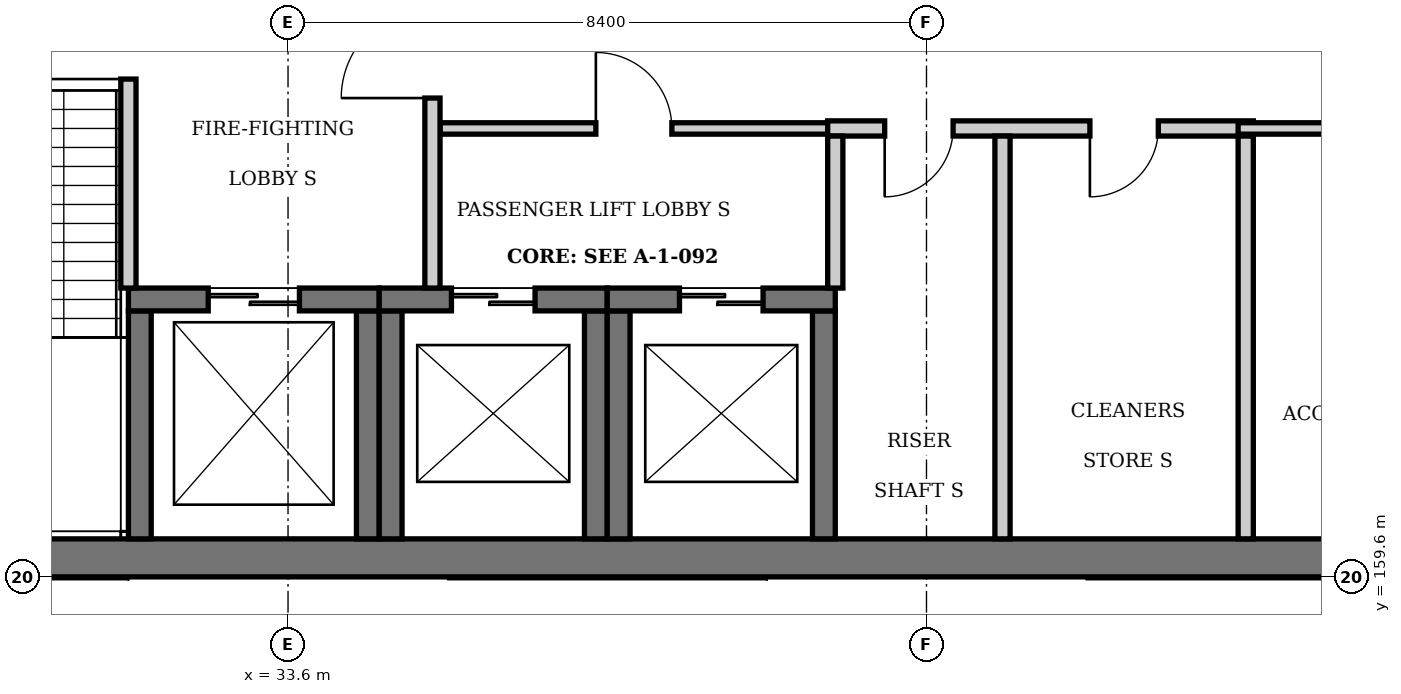
"""IFC4 building model, lengths in metres.
Left out: names, types, materials, properties, quantities, classifications, styles, units other than length and angle.
Written with IfcOpenShell. Run it as: python <this file> out.ifc"""

import sys

from ifc_helpers import new_model, si_unit, direction, frame, frame_2d, origin, place, context, subcontext, project, spatial, rectangle, extrude, element, fill, save


model = new_model("IFC4")
c1 = context("Model", 3, precision=1e-05, world=origin(), true_north=direction((0.0, 1.0)))
c2 = subcontext(c1, "Body", "Model", "MODEL_VIEW")
j1 = project(units=[si_unit("LENGTHUNIT", "METRE"), si_unit("PLANEANGLEUNIT", "RADIAN")], contexts=[c1])
p1 = place(None, origin())
s1 = spatial("IfcSite", under=j1, at=p1, CompositionType="ELEMENT")
p2 = place(p1, origin())
s2 = spatial("IfcBuilding", under=s1, at=p2, CompositionType="ELEMENT")
p3 = place(p2, frame((0.0, 0.0, 6.0)))
s3 = spatial("IfcBuildingStorey", under=s2, at=p3, CompositionType="ELEMENT", Elevation=6.0)
p4 = place(p3, frame((25.35, 159.85, 0.0), z_axis=(0.0, 0.0, 1.0), x_axis=(1.0, 0.0, 0.0)))
e1 = element("IfcWall", 1, at=p4, inside=s3, PredefinedType="SHEAR", context=c2, shape_type="SweptSolid", body=[
    extrude(rectangle(XDim=25.043, YDim=0.5, at=frame_2d((12.521, 0.0))), origin(), (0.0, 0.0, 1.0), 4.8),
])
for number, where, z_axis, x_axis in (
    (2, (34.65, 160.1, 0.0), (0.0, 0.0, 1.0), (0.0, 1.0, 0.0)),
    (3, (31.65, 160.1, 0.0), (0.0, 0.0, 1.0), (0.0, 1.0, 0.0)),
):
    element("IfcWall", number, at=place(p3, frame(where, z_axis=z_axis, x_axis=x_axis)), inside=s3, PredefinedType="SHEAR", context=c2, shape_type="SweptSolid", body=[
        extrude(rectangle(XDim=3.0, YDim=0.3, at=frame_2d((1.5, 0.0))), origin(), (0.0, 0.0, 1.0), 4.8),
    ])
p5 = place(p3, frame((31.5, 163.25, 0.0), z_axis=(0.0, 0.0, 1.0), x_axis=(1.0, 0.0, 0.0)))
e4 = element("IfcWall", 4, at=p5, inside=s3, PredefinedType="SHEAR", context=c2, shape_type="SweptSolid", body=[
    extrude(rectangle(XDim=3.3, YDim=0.3, at=frame_2d((1.65, 0.0))), origin(), (0.0, 0.0, 1.0), 4.8),
])
p6 = place(p5, frame((1.05, 0.0, 0.0)))
e5 = element("IfcOpeningElement", 5, at=p6, cuts=e4, PredefinedType="OPENING", context=c2, shape_type="SweptSolid", body=[
    extrude(rectangle(XDim=1.2, YDim=2.1, at=frame_2d((0.6, 1.05))), frame((0.0, 0.16, 0.0), z_axis=(0.0, -1.0, 0.0), x_axis=(1.0, 0.0, 0.0)), (0.0, 0.0, 1.0), 0.32),
])
for number, where, z_axis, x_axis in (
    (6, (37.65, 160.1, 0.0), (0.0, 0.0, 1.0), (0.0, 1.0, 0.0)),
    (7, (34.95, 160.1, 0.0), (0.0, 0.0, 1.0), (0.0, 1.0, 0.0)),
):
    element("IfcWall", number, at=place(p3, frame(where, z_axis=z_axis, x_axis=x_axis)), inside=s3, PredefinedType="SHEAR", context=c2, shape_type="SweptSolid", body=[
        extrude(rectangle(XDim=3.0, YDim=0.3, at=frame_2d((1.5, 0.0))), origin(), (0.0, 0.0, 1.0), 4.8),
    ])
p7 = place(p3, frame((34.8, 163.25, 0.0), z_axis=(0.0, 0.0, 1.0), x_axis=(1.0, 0.0, 0.0)))
e8 = element("IfcWall", 8, at=p7, inside=s3, PredefinedType="SHEAR", context=c2, shape_type="SweptSolid", body=[
    extrude(rectangle(XDim=3.0, YDim=0.3, at=frame_2d((1.5, 0.0))), origin(), (0.0, 0.0, 1.0), 4.8),
])
p8 = place(p7, frame((0.95, 0.0, 0.0)))
e9 = element("IfcOpeningElement", 9, at=p8, cuts=e8, PredefinedType="OPENING", context=c2, shape_type="SweptSolid", body=[
    extrude(rectangle(XDim=1.1, YDim=2.1, at=frame_2d((0.55, 1.05))), frame((0.0, 0.16, 0.0), z_axis=(0.0, -1.0, 0.0), x_axis=(1.0, 0.0, 0.0)), (0.0, 0.0, 1.0), 0.32),
])
for number, where, z_axis, x_axis in (
    (10, (40.65, 160.1, 0.0), (0.0, 0.0, 1.0), (0.0, 1.0, 0.0)),
    (11, (37.95, 160.1, 0.0), (0.0, 0.0, 1.0), (0.0, 1.0, 0.0)),
):
    element("IfcWall", number, at=place(p3, frame(where, z_axis=z_axis, x_axis=x_axis)), inside=s3, PredefinedType="SHEAR", context=c2, shape_type="SweptSolid", body=[
        extrude(rectangle(XDim=3.0, YDim=0.3, at=frame_2d((1.5, 0.0))), origin(), (0.0, 0.0, 1.0), 4.8),
    ])
p9 = place(p3, frame((37.8, 163.25, 0.0), z_axis=(0.0, 0.0, 1.0), x_axis=(1.0, 0.0, 0.0)))
e12 = element("IfcWall", 12, at=p9, inside=s3, PredefinedType="SHEAR", context=c2, shape_type="SweptSolid", body=[
    extrude(rectangle(XDim=3.0, YDim=0.3, at=frame_2d((1.5, 0.0))), origin(), (0.0, 0.0, 1.0), 4.8),
])
p10 = place(p9, frame((0.95, 0.0, 0.0)))
e13 = element("IfcOpeningElement", 13, at=p10, cuts=e12, PredefinedType="OPENING", context=c2, shape_type="SweptSolid", body=[
    extrude(rectangle(XDim=1.1, YDim=2.1, at=frame_2d((0.55, 1.05))), frame((0.0, 0.16, 0.0), z_axis=(0.0, -1.0, 0.0), x_axis=(1.0, 0.0, 0.0)), (0.0, 0.0, 1.0), 0.32),
])
p11 = place(p3, frame((35.6, 165.5, 0.0), z_axis=(0.0, 0.0, 1.0), x_axis=(1.0, 0.0, 0.0)))
e14 = element("IfcWall", 14, at=p11, inside=s3, PredefinedType="PARTITIONING", context=c2, shape_type="SweptSolid", body=[
    extrude(rectangle(XDim=5.3, YDim=0.15, at=frame_2d((2.65, 0.0))), origin(), (0.0, 0.0, 1.0), 4.55),
])
p12 = place(p11, frame((2.05, 0.0, 0.0)))
e15 = element("IfcOpeningElement", 15, at=p12, cuts=e14, PredefinedType="OPENING", context=c2, shape_type="SweptSolid", body=[
    extrude(rectangle(XDim=1.0, YDim=2.1, at=frame_2d((0.5, 1.05))), frame((0.0, 0.085, 0.0), z_axis=(0.0, -1.0, 0.0), x_axis=(1.0, 0.0, 0.0)), (0.0, 0.0, 1.0), 0.17),
])
p13 = place(p3, frame((40.7, 165.5, 0.0), z_axis=(0.0, 0.0, 1.0), x_axis=(1.0, 0.0, 0.0)))
e16 = element("IfcWall", 16, at=p13, inside=s3, PredefinedType="PARTITIONING", context=c2, shape_type="SweptSolid", body=[
    extrude(rectangle(XDim=5.6, YDim=0.2, at=frame_2d((2.8, 0.0))), origin(), (0.0, 0.0, 1.0), 4.55),
])
p14 = place(p13, frame((0.75, 0.0, 0.0)))
e17 = element("IfcOpeningElement", 17, at=p14, cuts=e16, PredefinedType="OPENING", context=c2, shape_type="SweptSolid", body=[
    extrude(rectangle(XDim=0.9, YDim=2.1, at=frame_2d((0.45, 1.05))), frame((0.0, 0.11, 0.0), z_axis=(0.0, -1.0, 0.0), x_axis=(1.0, 0.0, 0.0)), (0.0, 0.0, 1.0), 0.22),
])
p15 = place(p13, frame((3.45, 0.0, 0.0)))
e18 = element("IfcOpeningElement", 18, at=p15, cuts=e16, PredefinedType="OPENING", context=c2, shape_type="SweptSolid", body=[
    extrude(rectangle(XDim=0.9, YDim=2.1, at=frame_2d((0.45, 1.05))), frame((0.0, 0.11, 0.0), z_axis=(0.0, -1.0, 0.0), x_axis=(1.0, 0.0, 0.0)), (0.0, 0.0, 1.0), 0.22),
])
p16 = place(p3, frame((46.1, 165.5, 0.0), z_axis=(0.0, 0.0, 1.0), x_axis=(1.0, 0.0, 0.0)))
e19 = element("IfcWall", 19, at=p16, inside=s3, PredefinedType="PARTITIONING", context=c2, shape_type="SweptSolid", body=[
    extrude(rectangle(XDim=3.4, YDim=0.15, at=frame_2d((1.7, 0.0))), origin(), (0.0, 0.0, 1.0), 4.55),
])
p17 = place(p16, frame((1.25, 0.0, 0.0)))
e20 = element("IfcOpeningElement", 20, at=p17, cuts=e19, PredefinedType="OPENING", context=c2, shape_type="SweptSolid", body=[
    extrude(rectangle(XDim=1.0, YDim=2.1, at=frame_2d((0.5, 1.05))), frame((0.0, 0.085, 0.0), z_axis=(0.0, -1.0, 0.0), x_axis=(1.0, 0.0, 0.0)), (0.0, 0.0, 1.0), 0.17),
])
p18 = place(p3, frame((31.5, 163.4, 0.0), z_axis=(0.0, 0.0, 1.0), x_axis=(0.0, 1.0, 0.0)))
e21 = element("IfcWall", 21, at=p18, inside=s3, PredefinedType="PARTITIONING", context=c2, shape_type="SweptSolid", body=[
    extrude(rectangle(XDim=4.1, YDim=0.2, at=frame_2d((2.05, 0.0))), origin(), (0.0, 0.0, 1.0), 4.55),
])
p19 = place(p18, frame((2.75, 0.0, 0.0)))
e22 = element("IfcOpeningElement", 22, at=p19, cuts=e21, PredefinedType="OPENING", context=c2, shape_type="SweptSolid", body=[
    extrude(rectangle(XDim=1.1, YDim=2.4, at=frame_2d((0.55, 1.2))), frame((0.0, 0.11, 0.0), z_axis=(0.0, -1.0, 0.0), x_axis=(1.0, 0.0, 0.0)), (0.0, 0.0, 1.0), 0.22),
])
p20 = place(p3, frame((35.5, 163.4, 0.0), z_axis=(0.0, 0.0, 1.0), x_axis=(0.0, 1.0, 0.0)))
e23 = element("IfcWall", 23, at=p20, inside=s3, PredefinedType="PARTITIONING", context=c2, shape_type="SweptSolid", body=[
    extrude(rectangle(XDim=4.1, YDim=0.2, at=frame_2d((2.05, 0.0))), origin(), (0.0, 0.0, 1.0), 4.55),
])
p21 = place(p20, frame((2.5, 0.0, 0.0)))
e24 = element("IfcOpeningElement", 24, at=p21, cuts=e23, PredefinedType="OPENING", context=c2, shape_type="SweptSolid", body=[
    extrude(rectangle(XDim=1.2, YDim=2.4, at=frame_2d((0.6, 1.2))), frame((0.0, 0.11, 0.0), z_axis=(0.0, -1.0, 0.0), x_axis=(1.0, 0.0, 0.0)), (0.0, 0.0, 1.0), 0.22),
])
p22 = place(p3, frame((40.8, 163.4, 0.0), z_axis=(0.0, 0.0, 1.0), x_axis=(0.0, 1.0, 0.0)))
e25 = element("IfcWall", 25, at=p22, inside=s3, PredefinedType="PARTITIONING", context=c2, shape_type="SweptSolid", body=[
    extrude(rectangle(XDim=2.0, YDim=0.2, at=frame_2d((1.0, 0.0))), origin(), (0.0, 0.0, 1.0), 4.55),
])
for number, where, z_axis, x_axis in (
    (26, (43.0, 160.1, 0.0), (0.0, 0.0, 1.0), (0.0, 1.0, 0.0)),
    (27, (46.2, 160.1, 0.0), (0.0, 0.0, 1.0), (0.0, 1.0, 0.0)),
):
    element("IfcWall", number, at=place(p3, frame(where, z_axis=z_axis, x_axis=x_axis)), inside=s3, PredefinedType="PARTITIONING", context=c2, shape_type="SweptSolid", body=[
        extrude(rectangle(XDim=5.3, YDim=0.2, at=frame_2d((2.65, 0.0))), origin(), (0.0, 0.0, 1.0), 4.55),
    ])
p23 = place(p12, origin())
e28 = element("IfcDoor", 28, at=p23, inside=s3, OperationType="SINGLE_SWING_LEFT", PredefinedType="DOOR", context=c2, shape_type="SweptSolid", body=[
    extrude(rectangle(XDim=1.0, YDim=2.1, at=frame_2d((0.5, 1.05))), frame((0.0, 0.025, 0.0), z_axis=(0.0, -1.0, 0.0), x_axis=(1.0, 0.0, 0.0)), (0.0, 0.0, 1.0), 0.05),
])
fill(e15, e28)
p24 = place(p21, origin())
e29 = element("IfcDoor", 29, at=p24, inside=s3, OperationType="SINGLE_SWING_LEFT", PredefinedType="DOOR", context=c2, shape_type="SweptSolid", body=[
    extrude(rectangle(XDim=1.2, YDim=2.4, at=frame_2d((0.6, 1.2))), frame((0.0, 0.025, 0.0), z_axis=(0.0, -1.0, 0.0), x_axis=(1.0, 0.0, 0.0)), (0.0, 0.0, 1.0), 0.05),
])
fill(e24, e29)
p25 = place(p14, frame((0.9, 0.0, 0.0), z_axis=(0.0, 0.0, 1.0), x_axis=(-1.0, 0.0, 0.0)))
e30 = element("IfcDoor", 30, at=p25, inside=s3, OperationType="SINGLE_SWING_RIGHT", PredefinedType="DOOR", context=c2, shape_type="SweptSolid", body=[
    extrude(rectangle(XDim=0.9, YDim=2.1, at=frame_2d((0.45, 1.05))), frame((0.0, 0.025, 0.0), z_axis=(0.0, -1.0, 0.0), x_axis=(1.0, 0.0, 0.0)), (0.0, 0.0, 1.0), 0.05),
])
fill(e17, e30)
p26 = place(p15, frame((0.9, 0.0, 0.0), z_axis=(0.0, 0.0, 1.0), x_axis=(-1.0, 0.0, 0.0)))
e31 = element("IfcDoor", 31, at=p26, inside=s3, OperationType="SINGLE_SWING_RIGHT", PredefinedType="DOOR", context=c2, shape_type="SweptSolid", body=[
    extrude(rectangle(XDim=0.9, YDim=2.1, at=frame_2d((0.45, 1.05))), frame((0.0, 0.025, 0.0), z_axis=(0.0, -1.0, 0.0), x_axis=(1.0, 0.0, 0.0)), (0.0, 0.0, 1.0), 0.05),
])
fill(e18, e31)
p27 = place(p19, origin())
e32 = element("IfcDoor", 32, at=p27, inside=s3, OperationType="SINGLE_SWING_LEFT", PredefinedType="DOOR", context=c2, shape_type="SweptSolid", body=[
    extrude(rectangle(XDim=1.1, YDim=2.4, at=frame_2d((0.55, 1.2))), frame((0.0, 0.025, 0.0), z_axis=(0.0, -1.0, 0.0), x_axis=(1.0, 0.0, 0.0)), (0.0, 0.0, 1.0), 0.05),
])
fill(e22, e32)
p28 = place(p6, origin())
e33 = element("IfcDoor", 33, at=p28, inside=s3, OperationType="SLIDING_TO_LEFT", PredefinedType="DOOR", context=c2, shape_type="SweptSolid", body=[
    extrude(rectangle(XDim=1.2, YDim=2.1, at=frame_2d((0.6, 1.05))), frame((0.0, 0.025, 0.0), z_axis=(0.0, -1.0, 0.0), x_axis=(1.0, 0.0, 0.0)), (0.0, 0.0, 1.0), 0.05),
])
fill(e5, e33)
p29 = place(p8, origin())
e34 = element("IfcDoor", 34, at=p29, inside=s3, OperationType="SLIDING_TO_LEFT", PredefinedType="DOOR", context=c2, shape_type="SweptSolid", body=[
    extrude(rectangle(XDim=1.1, YDim=2.1, at=frame_2d((0.55, 1.05))), frame((0.0, 0.025, 0.0), z_axis=(0.0, -1.0, 0.0), x_axis=(1.0, 0.0, 0.0)), (0.0, 0.0, 1.0), 0.05),
])
fill(e9, e34)
p30 = place(p10, origin())
e35 = element("IfcDoor", 35, at=p30, inside=s3, OperationType="SLIDING_TO_LEFT", PredefinedType="DOOR", context=c2, shape_type="SweptSolid", body=[
    extrude(rectangle(XDim=1.1, YDim=2.1, at=frame_2d((0.55, 1.05))), frame((0.0, 0.025, 0.0), z_axis=(0.0, -1.0, 0.0), x_axis=(1.0, 0.0, 0.0)), (0.0, 0.0, 1.0), 0.05),
])
fill(e13, e35)
save(model, sys.argv[1])
